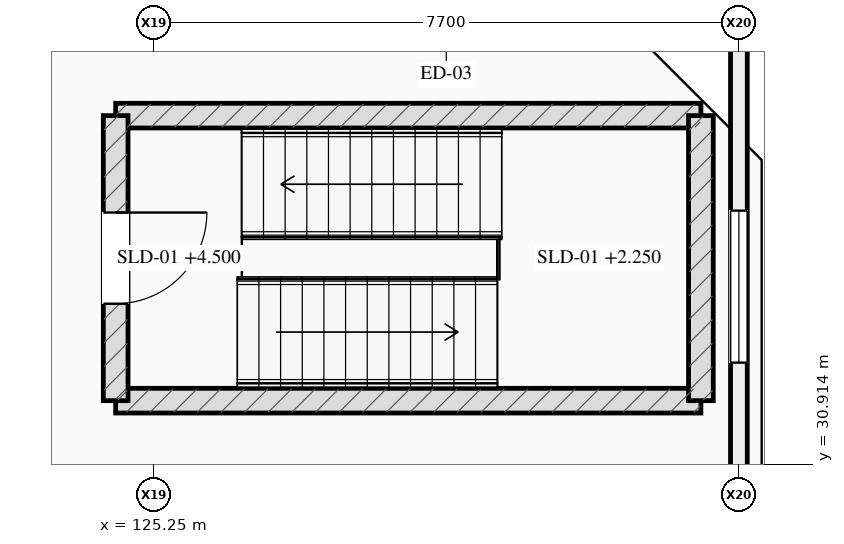
"""IFC4 building model, lengths in metres.
Left out: names, types, materials, properties, quantities, classifications, styles, units other than length and angle.
Written with IfcOpenShell. Run it as: python <this file> out.ifc"""

import sys

from ifc_helpers import new_model, si_unit, direction, frame, frame_2d, origin, place, context, subcontext, project, spatial, rectangle, extrude, element, fill, save


model = new_model("IFC4")
c1 = context("Model", 3, precision=1e-05, world=origin(), true_north=direction((0.0, 1.0)))
c2 = subcontext(c1, "Body", "Model", "MODEL_VIEW")
j1 = project(units=[si_unit("LENGTHUNIT", "METRE"), si_unit("PLANEANGLEUNIT", "RADIAN")], contexts=[c1])
p1 = place(None, origin())
s1 = spatial("IfcSite", under=j1, at=p1, CompositionType="ELEMENT")
p2 = place(p1, origin())
s2 = spatial("IfcBuilding", under=s1, at=p2, CompositionType="ELEMENT")
p3 = place(p2, origin())
s3 = spatial("IfcBuildingStorey", under=s2, at=p3, CompositionType="ELEMENT", Elevation=0.0)
p4 = place(p3, frame((132.95, 36.4, 0.0), z_axis=(0.0, 0.0, 1.0), x_axis=(0.0, -1.0, 0.0)))
e1 = element("IfcWall", 1, at=p4, inside=s3, PredefinedType="STANDARD", context=c2, shape_type="SweptSolid", body=[
    extrude(rectangle(XDim=6.3, YDim=0.22, at=frame_2d((3.15, 0.0))), origin(), (0.0, 0.0, 1.0), 3.24),
])
p5 = place(p4, frame((2.15, 0.0, 0.92)))
e2 = element("IfcOpeningElement", 2, at=p5, cuts=e1, PredefinedType="OPENING", context=c2, shape_type="SweptSolid", body=[
    extrude(rectangle(XDim=2.0, YDim=1.5, at=frame_2d((1.0, 0.75))), frame((0.0, 0.12, 0.0), z_axis=(0.0, -1.0, 0.0), x_axis=(1.0, 0.0, 0.0)), (0.0, 0.0, 1.0), 0.24),
])
for number, where, z_axis, x_axis in (
    (3, (132.45, 31.75, 0.0), (0.0, 0.0, 1.0), (-1.0, 0.0, 0.0)),
    (4, (124.75, 35.5, 0.0), (0.0, 0.0, 1.0), (1.0, 0.0, 0.0)),
):
    element("IfcWall", number, at=place(p3, frame(where, z_axis=z_axis, x_axis=x_axis)), inside=s3, PredefinedType="SHEAR", context=c2, shape_type="SweptSolid", body=[
        extrude(rectangle(XDim=7.7, YDim=0.325, at=frame_2d((3.85, 0.0))), origin(), (0.0, 0.0, 1.0), 4.26),
    ])
p6 = place(p3, frame((124.75, 31.75, 0.0), z_axis=(0.0, 0.0, 1.0), x_axis=(0.0, 1.0, 0.0)))
e5 = element("IfcWall", 5, at=p6, inside=s3, PredefinedType="SHEAR", context=c2, shape_type="SweptSolid", body=[
    extrude(rectangle(XDim=3.75, YDim=0.325, at=frame_2d((1.875, 0.0))), origin(), (0.0, 0.0, 1.0), 4.26),
])
p7 = place(p6, frame((1.275, 0.0, 0.0)))
e6 = element("IfcOpeningElement", 6, at=p7, cuts=e5, PredefinedType="OPENING", context=c2, shape_type="SweptSolid", body=[
    extrude(rectangle(XDim=1.2, YDim=2.2, at=frame_2d((0.6, 1.1))), frame((0.0, 0.172, 0.0), z_axis=(0.0, -1.0, 0.0), x_axis=(1.0, 0.0, 0.0)), (0.0, 0.0, 1.0), 0.345),
])
p8 = place(p3, frame((132.45, 35.5, 0.0), z_axis=(0.0, 0.0, 1.0), x_axis=(0.0, -1.0, 0.0)))
e7 = element("IfcWall", 7, at=p8, inside=s3, PredefinedType="SHEAR", context=c2, shape_type="SweptSolid", body=[
    extrude(rectangle(XDim=3.75, YDim=0.325, at=frame_2d((1.875, 0.0))), origin(), (0.0, 0.0, 1.0), 4.26),
])
p9 = place(p5, origin())
e8 = element("IfcWindow", 8, at=p9, inside=s3, PartitioningType="SINGLE_PANEL", PredefinedType="WINDOW", context=c2, shape_type="SweptSolid", body=[
    extrude(rectangle(XDim=2.0, YDim=1.5, at=frame_2d((1.0, 0.75))), frame((0.0, 0.03, 0.0), z_axis=(0.0, -1.0, 0.0), x_axis=(1.0, 0.0, 0.0)), (0.0, 0.0, 1.0), 0.06),
])
fill(e2, e8)
p10 = place(p7, origin())
e9 = element("IfcDoor", 9, at=p10, inside=s3, OperationType="SINGLE_SWING_RIGHT", PredefinedType="DOOR", context=c2, shape_type="SweptSolid", body=[
    extrude(rectangle(XDim=1.2, YDim=2.2, at=frame_2d((0.6, 1.1))), frame((0.0, 0.025, 0.0), z_axis=(0.0, -1.0, 0.0), x_axis=(1.0, 0.0, 0.0)), (0.0, 0.0, 1.0), 0.05),
])
fill(e6, e9)
save(model, sys.argv[1])
